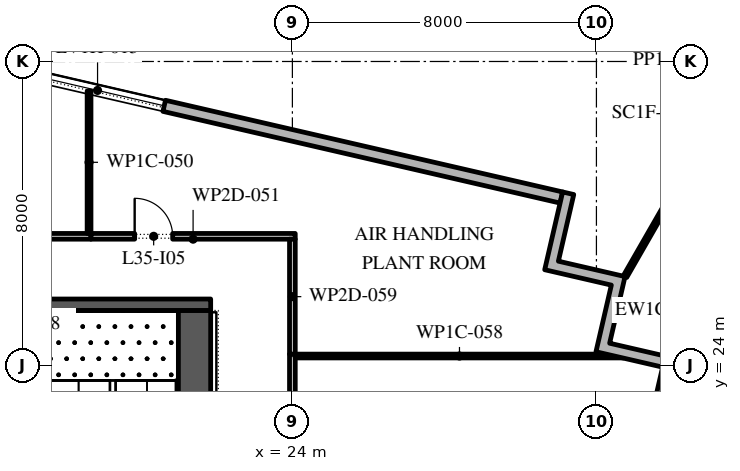
"""IFC4 building model, lengths in metres.
Left out: names, types, materials, properties, quantities, classifications, styles, units other than length and angle.
Written with IfcOpenShell. Run it as: python <this file> out.ifc"""

import sys

from ifc_helpers import new_model, si_unit, direction, frame, frame_2d, origin, place, context, subcontext, project, spatial, polyline, rectangle, outline, extrude, element, fill, save


model = new_model("IFC4")
c1 = context("Model", 3, precision=1e-05, world=origin(), true_north=direction((0.0, 1.0)))
c2 = subcontext(c1, "Body", "Model", "MODEL_VIEW")
j1 = project(units=[si_unit("LENGTHUNIT", "METRE"), si_unit("PLANEANGLEUNIT", "RADIAN")], contexts=[c1])
p1 = place(None, origin())
s1 = spatial("IfcSite", under=j1, at=p1, CompositionType="ELEMENT")
p2 = place(p1, origin())
s2 = spatial("IfcBuilding", under=s1, at=p2, CompositionType="ELEMENT")
p3 = place(p2, frame((0.0, 0.0, 160.2)))
s3 = spatial("IfcBuildingStorey", under=s2, at=p3, CompositionType="ELEMENT", Elevation=160.2)
p4 = place(p3, frame((22.82, -24.016, 0.0), z_axis=(0.0, 0.0, 1.0), x_axis=(0.224953880882, 0.974369412223, 0.0)))
e1 = element("IfcWall", 1, at=p4, inside=s3, PredefinedType="STANDARD", context=c2, shape_type="SweptSolid", body=[
    extrude(rectangle(XDim=49.5, YDim=0.3, at=frame_2d((24.75, 0.0))), origin(), (0.0, 0.0, 1.0), 4.95),
])
p5 = place(p4, frame((15.686, 0.0, 0.6)))
e2 = element("IfcOpeningElement", 2, at=p5, cuts=e1, PredefinedType="OPENING", context=c2, shape_type="SweptSolid", body=[
    extrude(rectangle(XDim=3.6, YDim=3.9, at=frame_2d((1.8, 1.95))), frame((0.0, 0.16, 0.0), z_axis=(0.0, -1.0, 0.0), x_axis=(1.0, 0.0, 0.0)), (0.0, 0.0, 1.0), 0.32),
])
p6 = place(p4, frame((22.8, 0.0, 0.6)))
e3 = element("IfcOpeningElement", 3, at=p6, cuts=e1, PredefinedType="OPENING", context=c2, shape_type="SweptSolid", body=[
    extrude(rectangle(XDim=3.6, YDim=3.9, at=frame_2d((1.8, 1.95))), frame((0.0, 0.16, 0.0), z_axis=(0.0, -1.0, 0.0), x_axis=(1.0, 0.0, 0.0)), (0.0, 0.0, 1.0), 0.32),
])
p7 = place(p4, frame((29.914, 0.0, 0.6)))
e4 = element("IfcOpeningElement", 4, at=p7, cuts=e1, PredefinedType="OPENING", context=c2, shape_type="SweptSolid", body=[
    extrude(rectangle(XDim=3.6, YDim=3.9, at=frame_2d((1.8, 1.95))), frame((0.0, 0.16, 0.0), z_axis=(0.0, -1.0, 0.0), x_axis=(1.0, 0.0, 0.0)), (0.0, 0.0, 1.0), 0.32),
])
p8 = place(p3, frame((31.078, 28.421, 0.0), z_axis=(0.0, 0.0, 1.0), x_axis=(-0.974370456532, 0.224949357493, 0.0)))
e5 = element("IfcWall", 5, at=p8, inside=s3, PredefinedType="STANDARD", context=c2, shape_type="SweptSolid", body=[
    extrude(rectangle(XDim=51.0, YDim=0.3, at=frame_2d((25.5, 0.0))), origin(), (0.0, 0.0, 1.0), 4.95),
])
p9 = place(p8, frame((10.725, 0.0, 0.6)))
e6 = element("IfcOpeningElement", 6, at=p9, cuts=e5, PredefinedType="OPENING", context=c2, shape_type="SweptSolid", body=[
    extrude(rectangle(XDim=3.6, YDim=3.25, at=frame_2d((1.8, 1.625))), frame((0.0, 0.16, 0.0), z_axis=(0.0, -1.0, 0.0), x_axis=(1.0, 0.0, 0.0)), (0.0, 0.0, 1.0), 0.32),
])
p10 = place(p8, frame((19.275, 0.0, 0.6)))
e7 = element("IfcOpeningElement", 7, at=p10, cuts=e5, PredefinedType="OPENING", context=c2, shape_type="SweptSolid", body=[
    extrude(rectangle(XDim=3.6, YDim=3.25, at=frame_2d((1.8, 1.625))), frame((0.0, 0.16, 0.0), z_axis=(0.0, -1.0, 0.0), x_axis=(1.0, 0.0, 0.0)), (0.0, 0.0, 1.0), 0.32),
])
p11 = place(p8, frame((27.825, 0.0, 0.6)))
e8 = element("IfcOpeningElement", 8, at=p11, cuts=e5, PredefinedType="OPENING", context=c2, shape_type="SweptSolid", body=[
    extrude(rectangle(XDim=3.6, YDim=3.9, at=frame_2d((1.8, 1.95))), frame((0.0, 0.16, 0.0), z_axis=(0.0, -1.0, 0.0), x_axis=(1.0, 0.0, 0.0)), (0.0, 0.0, 1.0), 0.32),
])
p12 = place(p8, frame((36.375, 0.0, 0.6)))
e9 = element("IfcOpeningElement", 9, at=p12, cuts=e5, PredefinedType="OPENING", context=c2, shape_type="SweptSolid", body=[
    extrude(rectangle(XDim=3.6, YDim=3.375, at=frame_2d((1.8, 1.688))), frame((0.0, 0.16, 0.0), z_axis=(0.0, -1.0, 0.0), x_axis=(1.0, 0.0, 0.0)), (0.0, 0.0, 1.0), 0.32),
])
p13 = place(p3, origin())
e10 = element("IfcWall", 10, at=p13, inside=s3, PredefinedType="STANDARD", context=c2, shape_type="SweptSolid", body=[
    extrude(outline(polyline([(32.393, 26.116), (30.639, 26.521), (31.111, 28.567), (31.404, 28.5), (30.999, 26.746), (32.753, 26.341), (32.348, 24.587), (33.809, 24.25), (33.742, 23.957), (31.988, 24.362), (32.393, 26.116)])), origin(), (0.0, 0.0, 1.0), 4.95),
])
p14 = place(p3, frame((24.143, -26.199, -0.05), z_axis=(0.0, 0.0, 1.0), x_axis=(0.224952358158, 0.974369763775, 0.0)))
e11 = element("IfcWall", 11, at=p14, inside=s3, PredefinedType="STANDARD", context=c2, shape_type="SweptSolid", body=[
    extrude(rectangle(XDim=58.569, YDim=0.2, at=frame_2d((29.285, 0.0))), origin(), (0.0, 0.0, 1.0), 1.1),
])
p15 = place(p3, frame((32.753, 26.341, -0.05), z_axis=(0.0, 0.0, 1.0), x_axis=(0.498186834491, 0.867069707659, 0.0)))
e12 = element("IfcWall", 12, at=p15, inside=s3, PredefinedType="STANDARD", context=c2, shape_type="SweptSolid", body=[
    extrude(rectangle(XDim=7.326, YDim=0.1, at=frame_2d((3.663, 0.0))), origin(), (0.0, 0.0, 1.0), 5.0),
])
p16 = place(p3, frame((21.425, -2.45, 0.0), z_axis=(0.0, 0.0, 1.0), x_axis=(0.0, 1.0, 0.0)))
e13 = element("IfcWall", 13, at=p16, inside=s3, PredefinedType="SHEAR", context=c2, shape_type="SweptSolid", body=[
    extrude(rectangle(XDim=27.9, YDim=0.85, at=frame_2d((13.95, 0.0))), origin(), (0.0, 0.0, 1.0), 4.95),
])
p17 = place(p16, frame((5.05, 0.0, 0.0)))
e14 = element("IfcOpeningElement", 14, at=p17, cuts=e13, PredefinedType="OPENING", context=c2, shape_type="SweptSolid", body=[
    extrude(rectangle(XDim=1.2, YDim=2.1, at=frame_2d((0.6, 1.05))), frame((0.0, 0.435, 0.0), z_axis=(0.0, -1.0, 0.0), x_axis=(1.0, 0.0, 0.0)), (0.0, 0.0, 1.0), 0.87),
])
p18 = place(p16, frame((21.65, 0.0, 0.0)))
e15 = element("IfcOpeningElement", 15, at=p18, cuts=e13, PredefinedType="OPENING", context=c2, shape_type="SweptSolid", body=[
    extrude(rectangle(XDim=1.2, YDim=2.1, at=frame_2d((0.6, 1.05))), frame((0.0, 0.435, 0.0), z_axis=(0.0, -1.0, 0.0), x_axis=(1.0, 0.0, 0.0)), (0.0, 0.0, 1.0), 0.87),
])
p19 = place(p3, frame((10.15, 25.6, 0.0), z_axis=(0.0, 0.0, 1.0), x_axis=(1.0, 0.0, 0.0)))
e16 = element("IfcWall", 16, at=p19, inside=s3, PredefinedType="SHEAR", context=c2, shape_type="SweptSolid", body=[
    extrude(rectangle(XDim=11.7, YDim=0.3, at=frame_2d((5.85, 0.0))), origin(), (0.0, 0.0, 1.0), 4.95),
])
p20 = place(p3, frame((8.075, 27.4, 0.0), z_axis=(0.0, 0.0, 1.0), x_axis=(1.0, 0.0, 0.0)))
e17 = element("IfcWall", 17, at=p20, inside=s3, PredefinedType="PARTITIONING", context=c2, shape_type="SweptSolid", body=[
    extrude(rectangle(XDim=10.625, YDim=0.15, at=frame_2d((5.312, 0.0))), origin(), (0.0, 0.0, 1.0), 4.95),
])
p21 = place(p20, frame((3.675, 0.0, 0.0)))
e18 = element("IfcOpeningElement", 18, at=p21, cuts=e17, PredefinedType="OPENING", context=c2, shape_type="SweptSolid", body=[
    extrude(rectangle(XDim=1.0, YDim=2.1, at=frame_2d((0.5, 1.05))), frame((0.0, 0.085, 0.0), z_axis=(0.0, -1.0, 0.0), x_axis=(1.0, 0.0, 0.0)), (0.0, 0.0, 1.0), 0.17),
])
p22 = place(p3, frame((18.65, 27.475, 0.0), z_axis=(0.0, 0.0, 1.0), x_axis=(0.0, 1.0, 0.0)))
e19 = element("IfcWall", 19, at=p22, inside=s3, PredefinedType="PARTITIONING", context=c2, shape_type="SweptSolid", body=[
    extrude(rectangle(XDim=3.744, YDim=0.1, at=frame_2d((1.872, 0.0))), origin(), (0.0, 0.0, 1.0), 4.95),
])
p23 = place(p3, frame((18.7, 27.4, 0.0), z_axis=(0.0, 0.0, 1.0), x_axis=(1.0, 0.0, 0.0)))
e20 = element("IfcWall", 20, at=p23, inside=s3, PredefinedType="PARTITIONING", context=c2, shape_type="SweptSolid", body=[
    extrude(rectangle(XDim=5.375, YDim=0.15, at=frame_2d((2.688, 0.0))), origin(), (0.0, 0.0, 1.0), 4.95),
])
p24 = place(p23, frame((1.15, 0.0, 0.0)))
e21 = element("IfcOpeningElement", 21, at=p24, cuts=e20, PredefinedType="OPENING", context=c2, shape_type="SweptSolid", body=[
    extrude(rectangle(XDim=1.0, YDim=2.1, at=frame_2d((0.5, 1.05))), frame((0.0, 0.085, 0.0), z_axis=(0.0, -1.0, 0.0), x_axis=(1.0, 0.0, 0.0)), (0.0, 0.0, 1.0), 0.17),
])
p25 = place(p3, frame((24.0, 24.3, 0.0), z_axis=(0.0, 0.0, 1.0), x_axis=(0.0, -1.0, 0.0)))
e22 = element("IfcWall", 22, at=p25, inside=s3, PredefinedType="PARTITIONING", context=c2, shape_type="SweptSolid", body=[
    extrude(rectangle(XDim=6.93, YDim=0.15, at=frame_2d((3.465, 0.0))), origin(), (0.0, 0.0, 1.0), 4.95),
])
p26 = place(p25, frame((4.33, 0.0, 0.0)))
e23 = element("IfcOpeningElement", 23, at=p26, cuts=e22, PredefinedType="OPENING", context=c2, shape_type="SweptSolid", body=[
    extrude(rectangle(XDim=1.0, YDim=2.1, at=frame_2d((0.5, 1.05))), frame((0.0, 0.085, 0.0), z_axis=(0.0, -1.0, 0.0), x_axis=(1.0, 0.0, 0.0)), (0.0, 0.0, 1.0), 0.17),
])
p27 = place(p3, frame((24.075, 24.25, 0.0), z_axis=(0.0, 0.0, 1.0), x_axis=(1.0, 0.0, 0.0)))
e24 = element("IfcWall", 24, at=p27, inside=s3, PredefinedType="PARTITIONING", context=c2, shape_type="SweptSolid", body=[
    extrude(rectangle(XDim=8.643, YDim=0.1, at=frame_2d((4.322, 0.0))), origin(), (0.0, 0.0, 1.0), 4.95),
])
p28 = place(p3, frame((24.0, 27.325, 0.0), z_axis=(0.0, 0.0, 1.0), x_axis=(0.0, -1.0, 0.0)))
e25 = element("IfcWall", 25, at=p28, inside=s3, PredefinedType="PARTITIONING", context=c2, shape_type="SweptSolid", body=[
    extrude(rectangle(XDim=3.025, YDim=0.15, at=frame_2d((1.512, 0.0))), origin(), (0.0, 0.0, 1.0), 4.95),
])
p29 = place(p9, origin())
e26 = element("IfcWindow", 26, at=p29, inside=s3, PartitioningType="DOUBLE_PANEL_HORIZONTAL", PredefinedType="WINDOW", context=c2, shape_type="SweptSolid", body=[
    extrude(rectangle(XDim=3.6, YDim=3.25, at=frame_2d((1.8, 1.625))), frame((0.0, 0.03, 0.0), z_axis=(0.0, -1.0, 0.0), x_axis=(1.0, 0.0, 0.0)), (0.0, 0.0, 1.0), 0.06),
])
fill(e6, e26)
p30 = place(p24, origin())
e27 = element("IfcDoor", 27, at=p30, inside=s3, OperationType="SINGLE_SWING_RIGHT", PredefinedType="DOOR", context=c2, shape_type="SweptSolid", body=[
    extrude(rectangle(XDim=1.0, YDim=2.1, at=frame_2d((0.5, 1.05))), frame((0.0, 0.025, 0.0), z_axis=(0.0, -1.0, 0.0), x_axis=(1.0, 0.0, 0.0)), (0.0, 0.0, 1.0), 0.05),
])
fill(e21, e27)
save(model, sys.argv[1])
